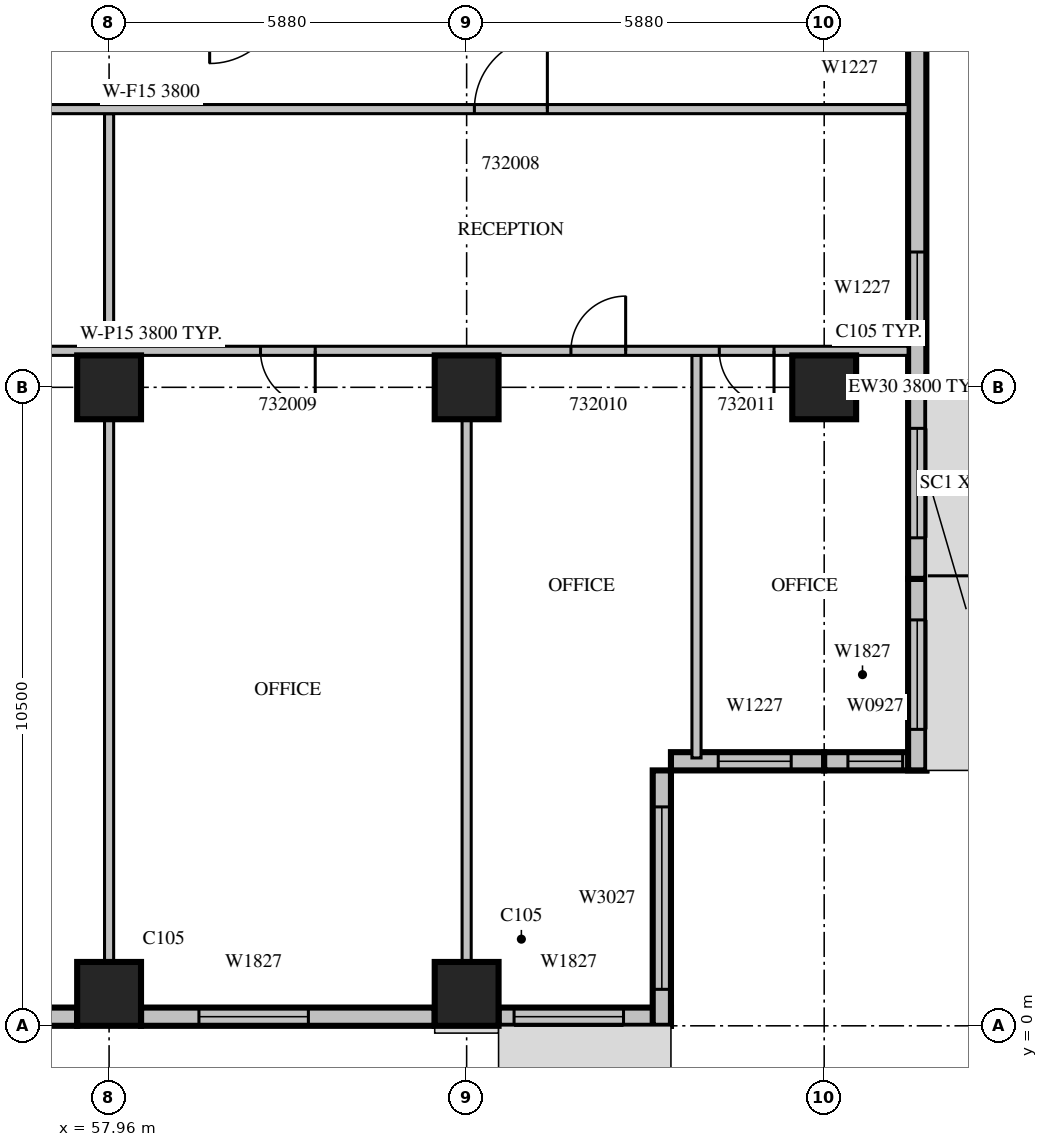
"""IFC4 building model, lengths in metres.
Left out: names, types, materials, properties, quantities, classifications, styles, units other than length and angle.
Written with IfcOpenShell. Run it as: python <this file> out.ifc"""

import sys

from ifc_helpers import new_model, si_unit, direction, frame, frame_2d, origin, origin_2d, place, context, subcontext, project, spatial, rectangle, extrude, source, transform, mapped, element, fill, save


model = new_model("IFC4")
c1 = context("Model", 3, precision=1e-05, world=origin(), true_north=direction((0.0, 1.0)))
c2 = subcontext(c1, "Body", "Model", "MODEL_VIEW")
j1 = project(units=[si_unit("LENGTHUNIT", "METRE"), si_unit("PLANEANGLEUNIT", "RADIAN")], contexts=[c1])
p1 = place(None, origin())
s1 = spatial("IfcSite", under=j1, at=p1, CompositionType="ELEMENT")
p2 = place(p1, origin())
s2 = spatial("IfcBuilding", under=s1, at=p2, CompositionType="ELEMENT")
p3 = place(p2, frame((0.0, 0.0, 145.5)))
s3 = spatial("IfcBuildingStorey", under=s2, at=p3, CompositionType="ELEMENT", Elevation=145.5)
m1 = source(origin(), c2, "Body", "SweptSolid", [
    extrude(rectangle(XDim=1.05, YDim=1.05, at=origin_2d()), origin(), (0.0, 0.0, 1.0), 4.2),
])
for number, where, z_axis, x_axis in (
    (1, (57.96, 0.525, 0.0), (0.0, 0.0, 1.0), (1.0, 0.0, 0.0)),
    (2, (63.84, 0.525, 0.0), (0.0, 0.0, 1.0), (1.0, 0.0, 0.0)),
    (3, (57.96, 10.5, 0.0), (0.0, 0.0, 1.0), (1.0, 0.0, 0.0)),
    (4, (63.84, 10.5, 0.0), (0.0, 0.0, 1.0), (1.0, 0.0, 0.0)),
    (5, (69.72, 10.5, 0.0), (0.0, 0.0, 1.0), (1.0, 0.0, 0.0)),
):
    element("IfcColumn", number, at=place(p3, frame(where, z_axis=z_axis, x_axis=x_axis)), inside=s3, PredefinedType="COLUMN", context=c2, shape_type="MappedRepresentation", body=[
        mapped(m1, transform((0.0, 0.0, 0.0), scale=1.0)),
    ])
m2 = source(origin(), c2, "Body", "SweptSolid", [
    extrude(rectangle(XDim=4.83, YDim=0.3, at=frame_2d((2.415, 0.0))), origin(), (0.0, 0.0, 1.0), 3.8),
])
p4 = place(p3, frame((52.605, 0.15, 0.0), z_axis=(0.0, 0.0, 1.0), x_axis=(1.0, 0.0, 0.0)))
e6 = element("IfcWall", 6, at=p4, inside=s3, PredefinedType="STANDARD", context=c2, shape_type="MappedRepresentation", body=[
    mapped(m2, transform((0.0, 0.0, 0.0), scale=1.0)),
])
m3 = source(origin(), c2, "Body", "SweptSolid", [
    extrude(rectangle(XDim=3.6, YDim=2.7, at=frame_2d((1.8, 1.35))), frame((0.0, 0.16, 0.0), z_axis=(0.0, -1.0, 0.0), x_axis=(1.0, 0.0, 0.0)), (0.0, 0.0, 1.0), 0.32),
])
p5 = place(p4, frame((0.615, 0.0, 0.6)))
e7 = element("IfcOpeningElement", 7, at=p5, cuts=e6, PredefinedType="OPENING", context=c2, shape_type="MappedRepresentation", body=[
    mapped(m3, transform((0.0, 0.0, 0.0), scale=1.0)),
])
p6 = place(p3, frame((58.485, 0.15, 0.0), z_axis=(0.0, 0.0, 1.0), x_axis=(1.0, 0.0, 0.0)))
e8 = element("IfcWall", 8, at=p6, inside=s3, PredefinedType="STANDARD", context=c2, shape_type="MappedRepresentation", body=[
    mapped(m2, transform((0.0, 0.0, 0.0), scale=1.0)),
])
m4 = source(origin(), c2, "Body", "SweptSolid", [
    extrude(rectangle(XDim=1.8, YDim=2.7, at=frame_2d((0.9, 1.35))), frame((0.0, 0.16, 0.0), z_axis=(0.0, -1.0, 0.0), x_axis=(1.0, 0.0, 0.0)), (0.0, 0.0, 1.0), 0.32),
])
p7 = place(p6, frame((0.953, 0.0, 0.6)))
e9 = element("IfcOpeningElement", 9, at=p7, cuts=e8, PredefinedType="OPENING", context=c2, shape_type="MappedRepresentation", body=[
    mapped(m4, transform((0.0, 0.0, 0.0), scale=1.0)),
])
m5 = source(origin(), c2, "Body", "SweptSolid", [
    extrude(rectangle(XDim=2.835, YDim=0.3, at=frame_2d((1.417, 0.0))), origin(), (0.0, 0.0, 1.0), 3.8),
])
p8 = place(p3, frame((64.365, 0.15, 0.0), z_axis=(0.0, 0.0, 1.0), x_axis=(1.0, 0.0, 0.0)))
e10 = element("IfcWall", 10, at=p8, inside=s3, PredefinedType="STANDARD", context=c2, shape_type="MappedRepresentation", body=[
    mapped(m5, transform((0.0, 0.0, 0.0), scale=1.0)),
])
p9 = place(p8, frame((0.255, 0.0, 0.6)))
e11 = element("IfcOpeningElement", 11, at=p9, cuts=e10, PredefinedType="OPENING", context=c2, shape_type="MappedRepresentation", body=[
    mapped(m4, transform((0.0, 0.0, 0.0), scale=1.0)),
])
m6 = source(origin(), c2, "Body", "SweptSolid", [
    extrude(rectangle(XDim=4.2, YDim=0.3, at=frame_2d((2.1, 0.0))), origin(), (0.0, 0.0, 1.0), 3.8),
])
p10 = place(p3, frame((67.05, 0.0, 0.0), z_axis=(0.0, 0.0, 1.0), x_axis=(0.0, 1.0, 0.0)))
e12 = element("IfcWall", 12, at=p10, inside=s3, PredefinedType="STANDARD", context=c2, shape_type="MappedRepresentation", body=[
    mapped(m6, transform((0.0, 0.0, 0.0), scale=1.0)),
])
m7 = source(origin(), c2, "Body", "SweptSolid", [
    extrude(rectangle(XDim=3.0, YDim=2.7, at=frame_2d((1.5, 1.35))), frame((0.0, 0.16, 0.0), z_axis=(0.0, -1.0, 0.0), x_axis=(1.0, 0.0, 0.0)), (0.0, 0.0, 1.0), 0.32),
])
p11 = place(p10, frame((0.6, 0.0, 0.6)))
e13 = element("IfcOpeningElement", 13, at=p11, cuts=e12, PredefinedType="OPENING", context=c2, shape_type="MappedRepresentation", body=[
    mapped(m7, transform((0.0, 0.0, 0.0), scale=1.0)),
])
m8 = source(origin(), c2, "Body", "SweptSolid", [
    extrude(rectangle(XDim=2.52, YDim=0.3, at=frame_2d((1.26, 0.0))), origin(), (0.0, 0.0, 1.0), 3.8),
])
p12 = place(p3, frame((67.2, 4.35, 0.0), z_axis=(0.0, 0.0, 1.0), x_axis=(1.0, 0.0, 0.0)))
e14 = element("IfcWall", 14, at=p12, inside=s3, PredefinedType="STANDARD", context=c2, shape_type="MappedRepresentation", body=[
    mapped(m8, transform((0.0, 0.0, 0.0), scale=1.0)),
])
m9 = source(origin(), c2, "Body", "SweptSolid", [
    extrude(rectangle(XDim=1.2, YDim=2.7, at=frame_2d((0.6, 1.35))), frame((0.0, 0.16, 0.0), z_axis=(0.0, -1.0, 0.0), x_axis=(1.0, 0.0, 0.0)), (0.0, 0.0, 1.0), 0.32),
])
p13 = place(p12, frame((0.777, 0.0, 0.6)))
e15 = element("IfcOpeningElement", 15, at=p13, cuts=e14, PredefinedType="OPENING", context=c2, shape_type="MappedRepresentation", body=[
    mapped(m9, transform((0.0, 0.0, 0.0), scale=1.0)),
])
m10 = source(origin(), c2, "Body", "SweptSolid", [
    extrude(rectangle(XDim=1.68, YDim=0.3, at=frame_2d((0.84, 0.0))), origin(), (0.0, 0.0, 1.0), 3.8),
])
p14 = place(p3, frame((69.72, 4.35, 0.0), z_axis=(0.0, 0.0, 1.0), x_axis=(1.0, 0.0, 0.0)))
e16 = element("IfcWall", 16, at=p14, inside=s3, PredefinedType="STANDARD", context=c2, shape_type="MappedRepresentation", body=[
    mapped(m10, transform((0.0, 0.0, 0.0), scale=1.0)),
])
m11 = source(origin(), c2, "Body", "SweptSolid", [
    extrude(rectangle(XDim=0.9, YDim=2.7, at=frame_2d((0.45, 1.35))), frame((0.0, 0.16, 0.0), z_axis=(0.0, -1.0, 0.0), x_axis=(1.0, 0.0, 0.0)), (0.0, 0.0, 1.0), 0.32),
])
p15 = place(p14, frame((0.39, 0.0, 0.6)))
e17 = element("IfcOpeningElement", 17, at=p15, cuts=e16, PredefinedType="OPENING", context=c2, shape_type="MappedRepresentation", body=[
    mapped(m11, transform((0.0, 0.0, 0.0), scale=1.0)),
])
m12 = source(origin(), c2, "Body", "SweptSolid", [
    extrude(rectangle(XDim=3.15, YDim=0.3, at=frame_2d((1.575, 0.0))), origin(), (0.0, 0.0, 1.0), 3.8),
])
p16 = place(p3, frame((71.25, 4.2, 0.0), z_axis=(0.0, 0.0, 1.0), x_axis=(0.0, 1.0, 0.0)))
e18 = element("IfcWall", 18, at=p16, inside=s3, PredefinedType="STANDARD", context=c2, shape_type="MappedRepresentation", body=[
    mapped(m12, transform((0.0, 0.0, 0.0), scale=1.0)),
])
p17 = place(p16, frame((0.675, 0.0, 0.6)))
e19 = element("IfcOpeningElement", 19, at=p17, cuts=e18, PredefinedType="OPENING", context=c2, shape_type="MappedRepresentation", body=[
    mapped(m4, transform((0.0, 0.0, 0.0), scale=1.0)),
])
p18 = place(p3, frame((71.25, 7.35, 0.0), z_axis=(0.0, 0.0, 1.0), x_axis=(0.0, 1.0, 0.0)))
e20 = element("IfcWall", 20, at=p18, inside=s3, PredefinedType="STANDARD", context=c2, shape_type="MappedRepresentation", body=[
    mapped(m12, transform((0.0, 0.0, 0.0), scale=1.0)),
])
m13 = source(origin(), c2, "Body", "SweptSolid", [
    extrude(rectangle(XDim=1.8, YDim=2.4, at=frame_2d((0.9, 1.2))), frame((0.0, 0.16, 0.0), z_axis=(0.0, -1.0, 0.0), x_axis=(1.0, 0.0, 0.0)), (0.0, 0.0, 1.0), 0.32),
])
p19 = place(p18, frame((0.675, 0.0, 0.0)))
e21 = element("IfcOpeningElement", 21, at=p19, cuts=e20, PredefinedType="OPENING", context=c2, shape_type="MappedRepresentation", body=[
    mapped(m13, transform((0.0, 0.0, 0.0), scale=1.0)),
])
m14 = source(origin(), c2, "Body", "SweptSolid", [
    extrude(rectangle(XDim=6.3, YDim=0.3, at=frame_2d((3.15, 0.0))), origin(), (0.0, 0.0, 1.0), 3.8),
])
p20 = place(p3, frame((71.25, 10.5, 0.0), z_axis=(0.0, 0.0, 1.0), x_axis=(0.0, 1.0, 0.0)))
e22 = element("IfcWall", 22, at=p20, inside=s3, PredefinedType="STANDARD", context=c2, shape_type="MappedRepresentation", body=[
    mapped(m14, transform((0.0, 0.0, 0.0), scale=1.0)),
])
p21 = place(p20, frame((1.025, 0.0, 0.6)))
e23 = element("IfcOpeningElement", 23, at=p21, cuts=e22, PredefinedType="OPENING", context=c2, shape_type="MappedRepresentation", body=[
    mapped(m9, transform((0.0, 0.0, 0.0), scale=1.0)),
])
m15 = source(origin(), c2, "Body", "SweptSolid", [
    extrude(rectangle(XDim=8.927, YDim=0.15, at=frame_2d((4.463, 0.0))), origin(), (0.0, 0.0, 1.0), 3.8),
])
p22 = place(p3, frame((63.84, 1.049, 0.0), z_axis=(0.0, 0.0, 1.0), x_axis=(0.0, 1.0, 0.0)))
e24 = element("IfcWall", 24, at=p22, inside=s3, PredefinedType="PARTITIONING", context=c2, shape_type="MappedRepresentation", body=[
    mapped(m15, transform((0.0, 0.0, 0.0), scale=1.0)),
])
m16 = source(origin(), c2, "Body", "SweptSolid", [
    extrude(rectangle(XDim=6.62, YDim=0.15, at=frame_2d((3.31, 0.0))), origin(), (0.0, 0.0, 1.0), 3.8),
])
p23 = place(p3, frame((67.62, 4.405, 0.0), z_axis=(0.0, 0.0, 1.0), x_axis=(0.0, 1.0, 0.0)))
e25 = element("IfcWall", 25, at=p23, inside=s3, PredefinedType="PARTITIONING", context=c2, shape_type="MappedRepresentation", body=[
    mapped(m16, transform((0.0, 0.0, 0.0), scale=1.0)),
])
p24 = place(p3, frame((57.96, 1.049, 0.0), z_axis=(0.0, 0.0, 1.0), x_axis=(0.0, 1.0, 0.0)))
e26 = element("IfcWall", 26, at=p24, inside=s3, PredefinedType="PARTITIONING", context=c2, shape_type="MappedRepresentation", body=[
    mapped(m15, transform((0.0, 0.0, 0.0), scale=1.0)),
])
m17 = source(origin(), c2, "Body", "SweptSolid", [
    extrude(rectangle(XDim=3.825, YDim=0.15, at=frame_2d((1.913, 0.0))), origin(), (0.0, 0.0, 1.0), 3.8),
])
p25 = place(p3, frame((57.96, 11.175, 0.0), z_axis=(0.0, 0.0, 1.0), x_axis=(0.0, 1.0, 0.0)))
e27 = element("IfcWall", 27, at=p25, inside=s3, PredefinedType="PARTITIONING", context=c2, shape_type="MappedRepresentation", body=[
    mapped(m17, transform((0.0, 0.0, 0.0), scale=1.0)),
])
m18 = source(origin(), c2, "Body", "SweptSolid", [
    extrude(rectangle(XDim=24.9, YDim=0.15, at=frame_2d((12.45, 0.0))), origin(), (0.0, 0.0, 1.0), 3.8),
])
p26 = place(p3, frame((71.1, 11.1, 0.0), z_axis=(0.0, 0.0, 1.0), x_axis=(-1.0, 0.0, 0.0)))
e28 = element("IfcWall", 28, at=p26, inside=s3, PredefinedType="PARTITIONING", context=c2, shape_type="MappedRepresentation", body=[
    mapped(m18, transform((0.0, 0.0, 0.0), scale=1.0)),
])
m19 = source(origin(), c2, "Body", "SweptSolid", [
    extrude(rectangle(XDim=0.9, YDim=2.1, at=frame_2d((0.45, 1.05))), frame((0.0, 0.085, 0.0), z_axis=(0.0, -1.0, 0.0), x_axis=(1.0, 0.0, 0.0)), (0.0, 0.0, 1.0), 0.17),
])
p27 = place(p26, frame((21.51, 0.0, 0.0)))
e29 = element("IfcOpeningElement", 29, at=p27, cuts=e28, PredefinedType="OPENING", context=c2, shape_type="MappedRepresentation", body=[
    mapped(m19, transform((0.0, 0.0, 0.0), scale=1.0)),
])
p28 = place(p26, frame((15.63, 0.0, 0.0)))
e30 = element("IfcOpeningElement", 30, at=p28, cuts=e28, PredefinedType="OPENING", context=c2, shape_type="MappedRepresentation", body=[
    mapped(m19, transform((0.0, 0.0, 0.0), scale=1.0)),
])
p29 = place(p26, frame((9.75, 0.0, 0.0)))
e31 = element("IfcOpeningElement", 31, at=p29, cuts=e28, PredefinedType="OPENING", context=c2, shape_type="MappedRepresentation", body=[
    mapped(m19, transform((0.0, 0.0, 0.0), scale=1.0)),
])
p30 = place(p26, frame((4.645, 0.0, 0.0)))
e32 = element("IfcOpeningElement", 32, at=p30, cuts=e28, PredefinedType="OPENING", context=c2, shape_type="MappedRepresentation", body=[
    mapped(m19, transform((0.0, 0.0, 0.0), scale=1.0)),
])
p31 = place(p26, frame((2.205, 0.0, 0.0)))
e33 = element("IfcOpeningElement", 33, at=p31, cuts=e28, PredefinedType="OPENING", context=c2, shape_type="MappedRepresentation", body=[
    mapped(m19, transform((0.0, 0.0, 0.0), scale=1.0)),
])
p32 = place(p3, frame((71.1, 15.075, 0.0), z_axis=(0.0, 0.0, 1.0), x_axis=(-1.0, 0.0, 0.0)))
e34 = element("IfcWall", 34, at=p32, inside=s3, PredefinedType="PARTITIONING", context=c2, shape_type="MappedRepresentation", body=[
    mapped(m18, transform((0.0, 0.0, 0.0), scale=1.0)),
])
m20 = source(origin(), c2, "Body", "SweptSolid", [
    extrude(rectangle(XDim=1.2, YDim=2.1, at=frame_2d((0.6, 1.05))), frame((0.0, 0.085, 0.0), z_axis=(0.0, -1.0, 0.0), x_axis=(1.0, 0.0, 0.0)), (0.0, 0.0, 1.0), 0.17),
])
p33 = place(p32, frame((18.42, 0.0, 0.0)))
e35 = element("IfcOpeningElement", 35, at=p33, cuts=e34, PredefinedType="OPENING", context=c2, shape_type="MappedRepresentation", body=[
    mapped(m20, transform((0.0, 0.0, 0.0), scale=1.0)),
])
p34 = place(p32, frame((5.933, 0.0, 0.0)))
e36 = element("IfcOpeningElement", 36, at=p34, cuts=e34, PredefinedType="OPENING", context=c2, shape_type="MappedRepresentation", body=[
    mapped(m20, transform((0.0, 0.0, 0.0), scale=1.0)),
])
m21 = source(origin(), c2, "Body", "SweptSolid", [
    extrude(rectangle(XDim=1.8, YDim=2.7, at=frame_2d((0.9, 1.35))), frame((0.0, 0.03, 0.0), z_axis=(0.0, -1.0, 0.0), x_axis=(1.0, 0.0, 0.0)), (0.0, 0.0, 1.0), 0.06),
])
p35 = place(p7, origin())
e37 = element("IfcWindow", 37, at=p35, inside=s3, PartitioningType="SINGLE_PANEL", PredefinedType="WINDOW", context=c2, shape_type="MappedRepresentation", body=[
    mapped(m21, transform((0.0, 0.0, 0.0), scale=1.0)),
])
fill(e9, e37)
p36 = place(p9, origin())
e38 = element("IfcWindow", 38, at=p36, inside=s3, PartitioningType="SINGLE_PANEL", PredefinedType="WINDOW", context=c2, shape_type="MappedRepresentation", body=[
    mapped(m21, transform((0.0, 0.0, 0.0), scale=1.0)),
])
fill(e11, e38)
m22 = source(origin(), c2, "Body", "SweptSolid", [
    extrude(rectangle(XDim=3.0, YDim=2.7, at=frame_2d((1.5, 1.35))), frame((0.0, 0.03, 0.0), z_axis=(0.0, -1.0, 0.0), x_axis=(1.0, 0.0, 0.0)), (0.0, 0.0, 1.0), 0.06),
])
p37 = place(p11, origin())
e39 = element("IfcWindow", 39, at=p37, inside=s3, PartitioningType="SINGLE_PANEL", PredefinedType="WINDOW", context=c2, shape_type="MappedRepresentation", body=[
    mapped(m22, transform((0.0, 0.0, 0.0), scale=1.0)),
])
fill(e13, e39)
m23 = source(origin(), c2, "Body", "SweptSolid", [
    extrude(rectangle(XDim=1.2, YDim=2.7, at=frame_2d((0.6, 1.35))), frame((0.0, 0.03, 0.0), z_axis=(0.0, -1.0, 0.0), x_axis=(1.0, 0.0, 0.0)), (0.0, 0.0, 1.0), 0.06),
])
p38 = place(p13, origin())
e40 = element("IfcWindow", 40, at=p38, inside=s3, PartitioningType="SINGLE_PANEL", PredefinedType="WINDOW", context=c2, shape_type="MappedRepresentation", body=[
    mapped(m23, transform((0.0, 0.0, 0.0), scale=1.0)),
])
fill(e15, e40)
m24 = source(origin(), c2, "Body", "SweptSolid", [
    extrude(rectangle(XDim=0.9, YDim=2.7, at=frame_2d((0.45, 1.35))), frame((0.0, 0.03, 0.0), z_axis=(0.0, -1.0, 0.0), x_axis=(1.0, 0.0, 0.0)), (0.0, 0.0, 1.0), 0.06),
])
p39 = place(p15, origin())
e41 = element("IfcWindow", 41, at=p39, inside=s3, PartitioningType="SINGLE_PANEL", PredefinedType="WINDOW", context=c2, shape_type="MappedRepresentation", body=[
    mapped(m24, transform((0.0, 0.0, 0.0), scale=1.0)),
])
fill(e17, e41)
p40 = place(p17, origin())
e42 = element("IfcWindow", 42, at=p40, inside=s3, PartitioningType="SINGLE_PANEL", PredefinedType="WINDOW", context=c2, shape_type="MappedRepresentation", body=[
    mapped(m21, transform((0.0, 0.0, 0.0), scale=1.0)),
])
fill(e19, e42)
m25 = source(origin(), c2, "Body", "SweptSolid", [
    extrude(rectangle(XDim=1.8, YDim=2.4, at=frame_2d((0.9, 1.2))), frame((0.0, 0.025, 0.0), z_axis=(0.0, -1.0, 0.0), x_axis=(1.0, 0.0, 0.0)), (0.0, 0.0, 1.0), 0.05),
])
p41 = place(p19, origin())
e43 = element("IfcDoor", 43, at=p41, inside=s3, OperationType="SLIDING_TO_LEFT", PredefinedType="DOOR", context=c2, shape_type="MappedRepresentation", body=[
    mapped(m25, transform((0.0, 0.0, 0.0), scale=1.0)),
])
fill(e21, e43)
p42 = place(p21, origin())
e44 = element("IfcWindow", 44, at=p42, inside=s3, PartitioningType="SINGLE_PANEL", PredefinedType="WINDOW", context=c2, shape_type="MappedRepresentation", body=[
    mapped(m23, transform((0.0, 0.0, 0.0), scale=1.0)),
])
fill(e23, e44)
m26 = source(origin(), c2, "Body", "SweptSolid", [
    extrude(rectangle(XDim=1.2, YDim=2.1, at=frame_2d((0.6, 1.05))), frame((0.0, 0.025, 0.0), z_axis=(0.0, -1.0, 0.0), x_axis=(1.0, 0.0, 0.0)), (0.0, 0.0, 1.0), 0.05),
])
p43 = place(p34, origin())
e45 = element("IfcDoor", 45, at=p43, inside=s3, OperationType="SINGLE_SWING_RIGHT", PredefinedType="DOOR", context=c2, shape_type="MappedRepresentation", body=[
    mapped(m26, transform((0.0, 0.0, 0.0), scale=1.0)),
])
fill(e36, e45)
m27 = source(origin(), c2, "Body", "SweptSolid", [
    extrude(rectangle(XDim=0.9, YDim=2.1, at=frame_2d((0.45, 1.05))), frame((0.0, 0.025, 0.0), z_axis=(0.0, -1.0, 0.0), x_axis=(1.0, 0.0, 0.0)), (0.0, 0.0, 1.0), 0.05),
])
p44 = place(p29, origin())
e46 = element("IfcDoor", 46, at=p44, inside=s3, OperationType="SINGLE_SWING_LEFT", PredefinedType="DOOR", context=c2, shape_type="MappedRepresentation", body=[
    mapped(m27, transform((0.0, 0.0, 0.0), scale=1.0)),
])
fill(e31, e46)
p45 = place(p30, origin())
e47 = element("IfcDoor", 47, at=p45, inside=s3, OperationType="SINGLE_SWING_RIGHT", PredefinedType="DOOR", context=c2, shape_type="MappedRepresentation", body=[
    mapped(m27, transform((0.0, 0.0, 0.0), scale=1.0)),
])
fill(e32, e47)
p46 = place(p31, origin())
e48 = element("IfcDoor", 48, at=p46, inside=s3, OperationType="SINGLE_SWING_LEFT", PredefinedType="DOOR", context=c2, shape_type="MappedRepresentation", body=[
    mapped(m27, transform((0.0, 0.0, 0.0), scale=1.0)),
])
fill(e33, e48)
save(model, sys.argv[1])
